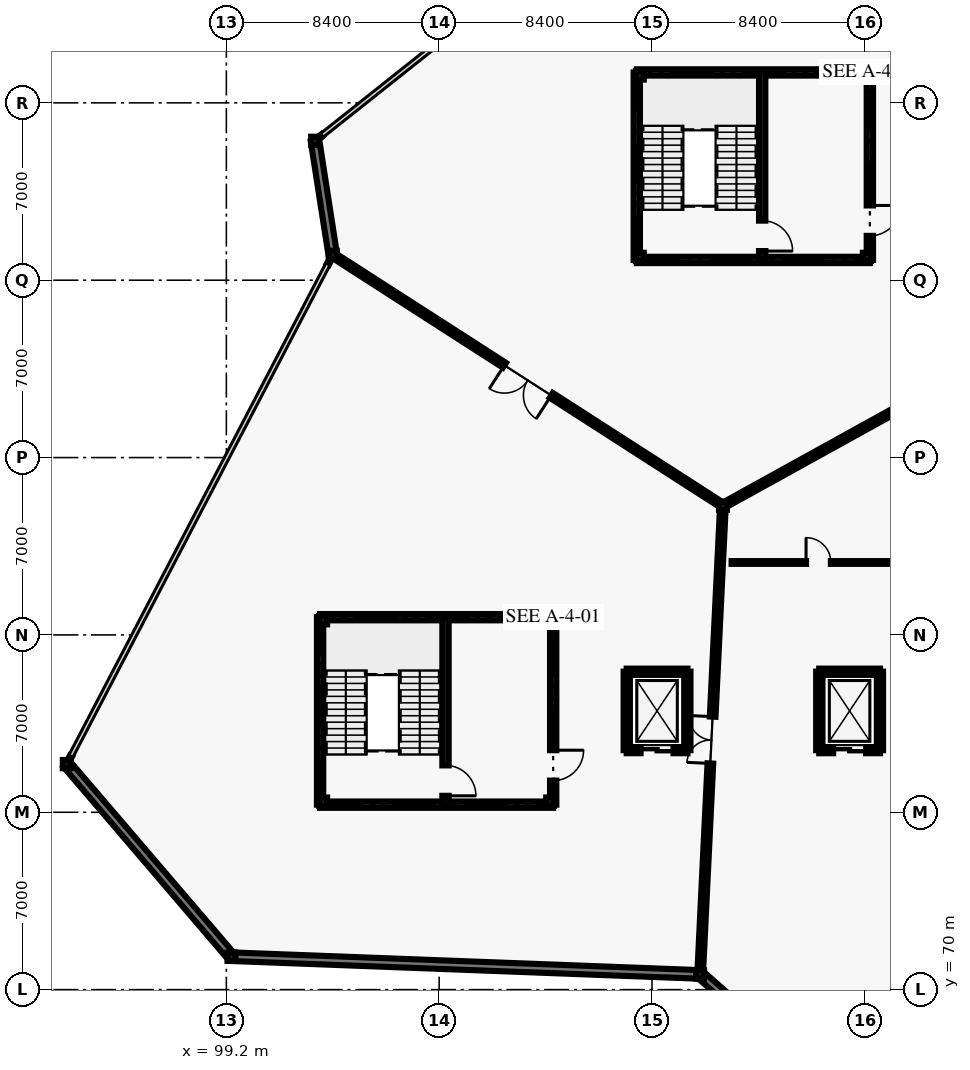
"""IFC4 building model, lengths in metres.
Left out: names, types, materials, properties, quantities, classifications, styles, units other than length and angle.
Written with IfcOpenShell. Run it as: python <this file> out.ifc"""

import sys

from ifc_helpers import new_model, si_unit, direction, frame, frame_2d, origin, origin_2d, place, context, subcontext, project, spatial, rectangle, i_section, extrude, element, fill, save


model = new_model("IFC4")
c1 = context("Model", 3, precision=1e-05, world=origin(), true_north=direction((0.0, 1.0)))
c2 = subcontext(c1, "Body", "Model", "MODEL_VIEW")
j1 = project(units=[si_unit("LENGTHUNIT", "METRE"), si_unit("PLANEANGLEUNIT", "RADIAN")], contexts=[c1])
p1 = place(None, origin())
s1 = spatial("IfcSite", under=j1, at=p1, CompositionType="ELEMENT")
p2 = place(p1, origin())
s2 = spatial("IfcBuilding", under=s1, at=p2, CompositionType="ELEMENT")
p3 = place(p2, frame((0.0, 0.0, 10.2)))
s3 = spatial("IfcBuildingStorey", under=s2, at=p3, CompositionType="ELEMENT", Elevation=10.2)
for number, where, z_axis, x_axis in (
    (1, (92.9, 78.9, 0.0), (0.0, 0.0, 1.0), (1.0, 0.0, 0.0)),
    (2, (99.4, 71.3, 0.0), (0.0, 0.0, 1.0), (1.0, 0.0, 0.0)),
    (3, (102.7, 103.5, 0.0), (0.0, 0.0, 1.0), (1.0, 0.0, 0.0)),
    (4, (103.4, 99.0, 0.0), (0.0, 0.0, 1.0), (1.0, 0.0, 0.0)),
    (5, (117.9, 70.6, 0.0), (0.0, 0.0, 1.0), (1.0, 0.0, 0.0)),
    (6, (118.8, 89.1, 0.0), (0.0, 0.0, 1.0), (1.0, 0.0, 0.0)),
    (7, (103.02, 77.42, 0.0), (0.0, 0.0, 1.0), (1.0, 0.0, 0.0)),
    (8, (111.98, 77.42, 0.0), (0.0, 0.0, 1.0), (1.0, 0.0, 0.0)),
    (9, (111.98, 84.58, 0.0), (0.0, 0.0, 1.0), (1.0, 0.0, 0.0)),
    (10, (103.02, 84.58, 0.0), (0.0, 0.0, 1.0), (1.0, 0.0, 0.0)),
    (11, (115.52, 98.92, 0.0), (0.0, 0.0, 1.0), (1.0, 0.0, 0.0)),
    (12, (124.48, 98.92, 0.0), (0.0, 0.0, 1.0), (1.0, 0.0, 0.0)),
    (13, (124.48, 106.08, 0.0), (0.0, 0.0, 1.0), (1.0, 0.0, 0.0)),
    (14, (115.52, 106.08, 0.0), (0.0, 0.0, 1.0), (1.0, 0.0, 0.0)),
):
    element("IfcColumn", number, at=place(p3, frame(where, z_axis=z_axis, x_axis=x_axis)), inside=s3, PredefinedType="COLUMN", context=c2, shape_type="SweptSolid", body=[
        extrude(i_section(OverallWidth=0.311, OverallDepth=0.327, WebThickness=0.016, FlangeThickness=0.025, FilletRadius=0.017, at=origin_2d()), origin(), (0.0, 0.0, 1.0), 4.8),
    ])
p4 = place(p3, frame((117.84, 70.602, 0.0), z_axis=(0.0, 0.0, 1.0), x_axis=(-0.999284381651, 0.037824920194, 0.0)))
e15 = element("IfcWall", 15, at=p4, inside=s3, PredefinedType="SOLIDWALL", context=c2, shape_type="SweptSolid", body=[
    extrude(rectangle(XDim=18.453, YDim=0.34, at=frame_2d((9.227, 0.0))), origin(), (0.0, 0.0, 1.0), 3.62),
])
for number, where, z_axis, x_axis in (
    (16, (92.919, 78.937, 0.0), (0.0, 0.0, 1.0), (0.464, 0.886, 0.0)),
    (17, (103.21, 98.637, 0.0), (0.0, 0.0, 1.0), (0.464, 0.886, 0.0)),
):
    element("IfcWall", number, at=place(p3, frame(where, z_axis=z_axis, x_axis=x_axis)), inside=s3, PredefinedType="SOLIDWALL", context=c2, shape_type="SweptSolid", body=[
        extrude(rectangle(XDim=0.308, YDim=0.095, at=frame_2d((0.154, 0.0))), origin(), (0.0, 0.0, 1.0), 3.62),
    ])
p5 = place(p3, frame((99.4, 71.3, 0.0), z_axis=(0.0, 0.0, 1.0), x_axis=(-0.649974737731, 0.75995581471, 0.0)))
e18 = element("IfcWall", 18, at=p5, inside=s3, PredefinedType="SOLIDWALL", context=c2, shape_type="SweptSolid", body=[
    extrude(rectangle(XDim=10.0, YDim=0.34, at=frame_2d((5.0, 0.0))), origin(), (0.0, 0.0, 1.0), 3.62),
])
p6 = place(p3, frame((125.5, 63.9, 0.0), z_axis=(0.0, 0.0, 1.0), x_axis=(-0.750131359252, 0.661288850554, 0.0)))
e19 = element("IfcWall", 19, at=p6, inside=s3, PredefinedType="SOLIDWALL", context=c2, shape_type="SweptSolid", body=[
    extrude(rectangle(XDim=10.072, YDim=0.34, at=frame_2d((5.036, 0.0))), origin(), (0.0, 0.0, 1.0), 3.62),
])
p7 = place(p3, frame((102.733, 103.526, 0.0), z_axis=(0.0, 0.0, 1.0), x_axis=(0.782180115256, 0.623052379257, 0.0)))
e20 = element("IfcWall", 20, at=p7, inside=s3, PredefinedType="SOLIDWALL", context=c2, shape_type="SweptSolid", body=[
    extrude(rectangle(XDim=0.308, YDim=0.095, at=frame_2d((0.154, 0.0))), origin(), (0.0, 0.0, 1.0), 3.62),
])
p8 = place(p3, frame((103.391, 99.059, 0.0), z_axis=(0.0, 0.0, 1.0), x_axis=(-0.153783616147, 0.988104548823, 0.0)))
e21 = element("IfcWall", 21, at=p8, inside=s3, PredefinedType="SOLIDWALL", context=c2, shape_type="SweptSolid", body=[
    extrude(rectangle(XDim=4.494, YDim=0.34, at=frame_2d((2.247, 0.0))), origin(), (0.0, 0.0, 1.0), 3.62),
])
p9 = place(p3, frame((117.9, 70.6, 0.0), z_axis=(0.0, 0.0, 1.0), x_axis=(0.048599072515, 0.998818366947, 0.0)))
e22 = element("IfcWall", 22, at=p9, inside=s3, PredefinedType="SOLIDWALL", context=c2, shape_type="SweptSolid", body=[
    extrude(rectangle(XDim=18.522, YDim=0.225, at=frame_2d((9.261, 0.0))), origin(), (0.0, 0.0, 1.0), 4.02),
])
p10 = place(p9, frame((8.336, 0.0, 0.0)))
e23 = element("IfcOpeningElement", 23, at=p10, cuts=e22, PredefinedType="OPENING", context=c2, shape_type="SweptSolid", body=[
    extrude(rectangle(XDim=1.85, YDim=2.4, at=frame_2d((0.925, 1.2))), frame((0.0, 0.123, 0.0), z_axis=(0.0, -1.0, 0.0), x_axis=(1.0, 0.0, 0.0)), (0.0, 0.0, 1.0), 0.245),
])
p11 = place(p3, frame((118.8, 89.1, 0.0), z_axis=(0.0, 0.0, 1.0), x_axis=(-0.841183241423, 0.540750177392, 0.0)))
e24 = element("IfcWall", 24, at=p11, inside=s3, PredefinedType="SOLIDWALL", context=c2, shape_type="SweptSolid", body=[
    extrude(rectangle(XDim=18.308, YDim=0.225, at=frame_2d((9.154, 0.0))), origin(), (0.0, 0.0, 1.0), 4.02),
])
p12 = place(p11, frame((8.054, 0.0, 0.0)))
e25 = element("IfcOpeningElement", 25, at=p12, cuts=e24, PredefinedType="OPENING", context=c2, shape_type="SweptSolid", body=[
    extrude(rectangle(XDim=2.2, YDim=2.6, at=frame_2d((1.1, 1.3))), frame((0.0, 0.123, 0.0), z_axis=(0.0, -1.0, 0.0), x_axis=(1.0, 0.0, 0.0)), (0.0, 0.0, 1.0), 0.245),
])
p13 = place(p3, frame((134.9, 98.0, 0.0), z_axis=(0.0, 0.0, 1.0), x_axis=(-0.875181353329, -0.483794996652, 0.0)))
e26 = element("IfcWall", 26, at=p13, inside=s3, PredefinedType="SOLIDWALL", context=c2, shape_type="SweptSolid", body=[
    extrude(rectangle(XDim=18.396, YDim=0.225, at=frame_2d((9.198, 0.0))), origin(), (0.0, 0.0, 1.0), 4.02),
])
p14 = place(p13, frame((8.198, 0.0, 0.0)))
e27 = element("IfcOpeningElement", 27, at=p14, cuts=e26, PredefinedType="OPENING", context=c2, shape_type="SweptSolid", body=[
    extrude(rectangle(XDim=2.0, YDim=2.5, at=frame_2d((1.0, 1.25))), frame((0.0, 0.123, 0.0), z_axis=(0.0, -1.0, 0.0), x_axis=(1.0, 0.0, 0.0)), (0.0, 0.0, 1.0), 0.245),
])
p15 = place(p3, frame((119.142, 86.859, 0.0), z_axis=(0.0, 0.0, 1.0), x_axis=(1.0, 0.0, 0.0)))
e28 = element("IfcWall", 28, at=p15, inside=s3, PredefinedType="PARTITIONING", context=c2, shape_type="SweptSolid", body=[
    extrude(rectangle(XDim=6.858, YDim=0.11, at=frame_2d((3.429, 0.0))), origin(), (0.0, 0.0, 1.0), 3.32),
])
p16 = place(p15, frame((2.939, 0.0, 0.0)))
e29 = element("IfcOpeningElement", 29, at=p16, cuts=e28, PredefinedType="OPENING", context=c2, shape_type="SweptSolid", body=[
    extrude(rectangle(XDim=0.98, YDim=2.15, at=frame_2d((0.49, 1.075))), frame((0.0, 0.065, 0.0), z_axis=(0.0, -1.0, 0.0), x_axis=(1.0, 0.0, 0.0)), (0.0, 0.0, 1.0), 0.13),
])
p17 = place(p3, frame((102.9, 77.3, 0.0), z_axis=(0.0, 0.0, 1.0), x_axis=(0.0, 1.0, 0.0)))
e30 = element("IfcWall", 30, at=p17, inside=s3, PredefinedType="SHEAR", context=c2, shape_type="SweptSolid", body=[
    extrude(rectangle(XDim=7.4, YDim=0.25, at=frame_2d((3.7, 0.0))), origin(), (0.0, 0.0, 1.0), 4.56),
])
for number, where, z_axis, x_axis in (
    (31, (102.9, 84.7, 0.0), (0.0, 0.0, 1.0), (1.0, 0.0, 0.0)),
    (32, (112.1, 77.3, 0.0), (0.0, 0.0, 1.0), (-1.0, 0.0, 0.0)),
):
    element("IfcWall", number, at=place(p3, frame(where, z_axis=z_axis, x_axis=x_axis)), inside=s3, PredefinedType="SHEAR", context=c2, shape_type="SweptSolid", body=[
        extrude(rectangle(XDim=9.2, YDim=0.25, at=frame_2d((4.6, 0.0))), origin(), (0.0, 0.0, 1.0), 4.56),
    ])
p18 = place(p3, frame((112.1, 84.7, 0.0), z_axis=(0.0, 0.0, 1.0), x_axis=(0.0, -1.0, 0.0)))
e33 = element("IfcWall", 33, at=p18, inside=s3, PredefinedType="SHEAR", context=c2, shape_type="SweptSolid", body=[
    extrude(rectangle(XDim=7.4, YDim=0.25, at=frame_2d((3.7, 0.0))), origin(), (0.0, 0.0, 1.0), 4.56),
])
p19 = place(p18, frame((5.25, 0.0, 0.0)))
e34 = element("IfcOpeningElement", 34, at=p19, cuts=e33, PredefinedType="OPENING", context=c2, shape_type="SweptSolid", body=[
    extrude(rectangle(XDim=1.2, YDim=2.2, at=frame_2d((0.6, 1.1))), frame((0.0, 0.135, 0.0), z_axis=(0.0, -1.0, 0.0), x_axis=(1.0, 0.0, 0.0)), (0.0, 0.0, 1.0), 0.27),
])
p20 = place(p3, frame((107.85, 84.7, 0.0), z_axis=(0.0, 0.0, 1.0), x_axis=(0.0, -1.0, 0.0)))
e35 = element("IfcWall", 35, at=p20, inside=s3, PredefinedType="SHEAR", context=c2, shape_type="SweptSolid", body=[
    extrude(rectangle(XDim=7.4, YDim=0.25, at=frame_2d((3.7, 0.0))), origin(), (0.0, 0.0, 1.0), 4.56),
])
p21 = place(p20, frame((5.85, 0.0, 0.0)))
e36 = element("IfcOpeningElement", 36, at=p21, cuts=e35, PredefinedType="OPENING", context=c2, shape_type="SweptSolid", body=[
    extrude(rectangle(XDim=1.2, YDim=2.2, at=frame_2d((0.6, 1.1))), frame((0.0, 0.135, 0.0), z_axis=(0.0, -1.0, 0.0), x_axis=(1.0, 0.0, 0.0)), (0.0, 0.0, 1.0), 0.27),
])
p22 = place(p3, frame((115.4, 98.8, 0.0), z_axis=(0.0, 0.0, 1.0), x_axis=(0.0, 1.0, 0.0)))
e37 = element("IfcWall", 37, at=p22, inside=s3, PredefinedType="SHEAR", context=c2, shape_type="SweptSolid", body=[
    extrude(rectangle(XDim=7.4, YDim=0.25, at=frame_2d((3.7, 0.0))), origin(), (0.0, 0.0, 1.0), 4.56),
])
for number, where, z_axis, x_axis in (
    (38, (115.4, 106.2, 0.0), (0.0, 0.0, 1.0), (1.0, 0.0, 0.0)),
    (39, (124.6, 98.8, 0.0), (0.0, 0.0, 1.0), (-1.0, 0.0, 0.0)),
):
    element("IfcWall", number, at=place(p3, frame(where, z_axis=z_axis, x_axis=x_axis)), inside=s3, PredefinedType="SHEAR", context=c2, shape_type="SweptSolid", body=[
        extrude(rectangle(XDim=9.2, YDim=0.25, at=frame_2d((4.6, 0.0))), origin(), (0.0, 0.0, 1.0), 4.56),
    ])
p23 = place(p3, frame((124.6, 106.2, 0.0), z_axis=(0.0, 0.0, 1.0), x_axis=(0.0, -1.0, 0.0)))
e40 = element("IfcWall", 40, at=p23, inside=s3, PredefinedType="SHEAR", context=c2, shape_type="SweptSolid", body=[
    extrude(rectangle(XDim=7.4, YDim=0.25, at=frame_2d((3.7, 0.0))), origin(), (0.0, 0.0, 1.0), 4.56),
])
p24 = place(p23, frame((5.25, 0.0, 0.0)))
e41 = element("IfcOpeningElement", 41, at=p24, cuts=e40, PredefinedType="OPENING", context=c2, shape_type="SweptSolid", body=[
    extrude(rectangle(XDim=1.2, YDim=2.2, at=frame_2d((0.6, 1.1))), frame((0.0, 0.135, 0.0), z_axis=(0.0, -1.0, 0.0), x_axis=(1.0, 0.0, 0.0)), (0.0, 0.0, 1.0), 0.27),
])
p25 = place(p3, frame((120.35, 106.2, 0.0), z_axis=(0.0, 0.0, 1.0), x_axis=(0.0, -1.0, 0.0)))
e42 = element("IfcWall", 42, at=p25, inside=s3, PredefinedType="SHEAR", context=c2, shape_type="SweptSolid", body=[
    extrude(rectangle(XDim=7.4, YDim=0.25, at=frame_2d((3.7, 0.0))), origin(), (0.0, 0.0, 1.0), 4.56),
])
p26 = place(p25, frame((5.85, 0.0, 0.0)))
e43 = element("IfcOpeningElement", 43, at=p26, cuts=e42, PredefinedType="OPENING", context=c2, shape_type="SweptSolid", body=[
    extrude(rectangle(XDim=1.2, YDim=2.2, at=frame_2d((0.6, 1.1))), frame((0.0, 0.135, 0.0), z_axis=(0.0, -1.0, 0.0), x_axis=(1.0, 0.0, 0.0)), (0.0, 0.0, 1.0), 0.27),
])
p27 = place(p3, frame((115.0, 82.55, 0.0), z_axis=(0.0, 0.0, 1.0), x_axis=(1.0, 0.0, 0.0)))
e44 = element("IfcWall", 44, at=p27, inside=s3, PredefinedType="SHEAR", context=c2, shape_type="SweptSolid", body=[
    extrude(rectangle(XDim=2.4, YDim=0.24, at=frame_2d((1.2, 0.0))), origin(), (0.0, 0.0, 1.0), 4.56),
])
for number, where, z_axis, x_axis in (
    (45, (117.4, 82.55, 0.0), (0.0, 0.0, 1.0), (0.0, -1.0, 0.0)),
    (46, (115.0, 79.45, 0.0), (0.0, 0.0, 1.0), (0.0, 1.0, 0.0)),
):
    element("IfcWall", number, at=place(p3, frame(where, z_axis=z_axis, x_axis=x_axis)), inside=s3, PredefinedType="SHEAR", context=c2, shape_type="SweptSolid", body=[
        extrude(rectangle(XDim=3.1, YDim=0.24, at=frame_2d((1.55, 0.0))), origin(), (0.0, 0.0, 1.0), 4.56),
    ])
p28 = place(p3, frame((117.4, 79.45, 0.0), z_axis=(0.0, 0.0, 1.0), x_axis=(-1.0, 0.0, 0.0)))
e47 = element("IfcWall", 47, at=p28, inside=s3, PredefinedType="SHEAR", context=c2, shape_type="SweptSolid", body=[
    extrude(rectangle(XDim=2.4, YDim=0.24, at=frame_2d((1.2, 0.0))), origin(), (0.0, 0.0, 1.0), 4.56),
])
p29 = place(p28, frame((0.55, 0.0, 0.0)))
e48 = element("IfcOpeningElement", 48, at=p29, cuts=e47, PredefinedType="OPENING", context=c2, shape_type="SweptSolid", body=[
    extrude(rectangle(XDim=1.3, YDim=2.25, at=frame_2d((0.65, 1.125))), frame((0.0, 0.13, 0.0), z_axis=(0.0, -1.0, 0.0), x_axis=(1.0, 0.0, 0.0)), (0.0, 0.0, 1.0), 0.26),
])
p30 = place(p3, frame((122.6, 82.55, 0.0), z_axis=(0.0, 0.0, 1.0), x_axis=(1.0, 0.0, 0.0)))
e49 = element("IfcWall", 49, at=p30, inside=s3, PredefinedType="SHEAR", context=c2, shape_type="SweptSolid", body=[
    extrude(rectangle(XDim=2.4, YDim=0.24, at=frame_2d((1.2, 0.0))), origin(), (0.0, 0.0, 1.0), 4.56),
])
for number, where, z_axis, x_axis in (
    (50, (125.0, 82.55, 0.0), (0.0, 0.0, 1.0), (0.0, -1.0, 0.0)),
    (51, (122.6, 79.45, 0.0), (0.0, 0.0, 1.0), (0.0, 1.0, 0.0)),
):
    element("IfcWall", number, at=place(p3, frame(where, z_axis=z_axis, x_axis=x_axis)), inside=s3, PredefinedType="SHEAR", context=c2, shape_type="SweptSolid", body=[
        extrude(rectangle(XDim=3.1, YDim=0.24, at=frame_2d((1.55, 0.0))), origin(), (0.0, 0.0, 1.0), 4.56),
    ])
p31 = place(p3, frame((125.0, 79.45, 0.0), z_axis=(0.0, 0.0, 1.0), x_axis=(-1.0, 0.0, 0.0)))
e52 = element("IfcWall", 52, at=p31, inside=s3, PredefinedType="SHEAR", context=c2, shape_type="SweptSolid", body=[
    extrude(rectangle(XDim=2.4, YDim=0.24, at=frame_2d((1.2, 0.0))), origin(), (0.0, 0.0, 1.0), 4.56),
])
p32 = place(p31, frame((0.55, 0.0, 0.0)))
e53 = element("IfcOpeningElement", 53, at=p32, cuts=e52, PredefinedType="OPENING", context=c2, shape_type="SweptSolid", body=[
    extrude(rectangle(XDim=1.3, YDim=2.25, at=frame_2d((0.65, 1.125))), frame((0.0, 0.13, 0.0), z_axis=(0.0, -1.0, 0.0), x_axis=(1.0, 0.0, 0.0)), (0.0, 0.0, 1.0), 0.26),
])
p33 = place(p10, origin())
e54 = element("IfcDoor", 54, at=p33, inside=s3, OperationType="DOUBLE_DOOR_SINGLE_SWING", PredefinedType="DOOR", context=c2, shape_type="SweptSolid", body=[
    extrude(rectangle(XDim=1.85, YDim=2.4, at=frame_2d((0.925, 1.2))), frame((0.0, 0.025, 0.0), z_axis=(0.0, -1.0, 0.0), x_axis=(1.0, 0.0, 0.0)), (0.0, 0.0, 1.0), 0.05),
])
fill(e23, e54)
p34 = place(p12, origin())
e55 = element("IfcDoor", 55, at=p34, inside=s3, OperationType="DOUBLE_DOOR_SINGLE_SWING", PredefinedType="DOOR", context=c2, shape_type="SweptSolid", body=[
    extrude(rectangle(XDim=2.2, YDim=2.6, at=frame_2d((1.1, 1.3))), frame((0.0, 0.025, 0.0), z_axis=(0.0, -1.0, 0.0), x_axis=(1.0, 0.0, 0.0)), (0.0, 0.0, 1.0), 0.05),
])
fill(e25, e55)
p35 = place(p16, origin())
e56 = element("IfcDoor", 56, at=p35, inside=s3, OperationType="SINGLE_SWING_LEFT", PredefinedType="DOOR", context=c2, shape_type="SweptSolid", body=[
    extrude(rectangle(XDim=0.98, YDim=2.15, at=frame_2d((0.49, 1.075))), frame((0.0, 0.025, 0.0), z_axis=(0.0, -1.0, 0.0), x_axis=(1.0, 0.0, 0.0)), (0.0, 0.0, 1.0), 0.05),
])
fill(e29, e56)
p36 = place(p19, origin())
e57 = element("IfcDoor", 57, at=p36, inside=s3, OperationType="SINGLE_SWING_LEFT", PredefinedType="DOOR", context=c2, shape_type="SweptSolid", body=[
    extrude(rectangle(XDim=1.2, YDim=2.2, at=frame_2d((0.6, 1.1))), frame((0.0, 0.025, 0.0), z_axis=(0.0, -1.0, 0.0), x_axis=(1.0, 0.0, 0.0)), (0.0, 0.0, 1.0), 0.05),
])
fill(e34, e57)
p37 = place(p21, origin())
e58 = element("IfcDoor", 58, at=p37, inside=s3, OperationType="SINGLE_SWING_RIGHT", PredefinedType="DOOR", context=c2, shape_type="SweptSolid", body=[
    extrude(rectangle(XDim=1.2, YDim=2.2, at=frame_2d((0.6, 1.1))), frame((0.0, 0.025, 0.0), z_axis=(0.0, -1.0, 0.0), x_axis=(1.0, 0.0, 0.0)), (0.0, 0.0, 1.0), 0.05),
])
fill(e36, e58)
p38 = place(p24, origin())
e59 = element("IfcDoor", 59, at=p38, inside=s3, OperationType="SINGLE_SWING_LEFT", PredefinedType="DOOR", context=c2, shape_type="SweptSolid", body=[
    extrude(rectangle(XDim=1.2, YDim=2.2, at=frame_2d((0.6, 1.1))), frame((0.0, 0.025, 0.0), z_axis=(0.0, -1.0, 0.0), x_axis=(1.0, 0.0, 0.0)), (0.0, 0.0, 1.0), 0.05),
])
fill(e41, e59)
p39 = place(p26, origin())
e60 = element("IfcDoor", 60, at=p39, inside=s3, OperationType="SINGLE_SWING_RIGHT", PredefinedType="DOOR", context=c2, shape_type="SweptSolid", body=[
    extrude(rectangle(XDim=1.2, YDim=2.2, at=frame_2d((0.6, 1.1))), frame((0.0, 0.025, 0.0), z_axis=(0.0, -1.0, 0.0), x_axis=(1.0, 0.0, 0.0)), (0.0, 0.0, 1.0), 0.05),
])
fill(e43, e60)
p40 = place(p29, origin())
e61 = element("IfcDoor", 61, at=p40, inside=s3, OperationType="SLIDING_TO_LEFT", PredefinedType="DOOR", context=c2, shape_type="SweptSolid", body=[
    extrude(rectangle(XDim=1.3, YDim=2.25, at=frame_2d((0.65, 1.125))), frame((0.0, 0.025, 0.0), z_axis=(0.0, -1.0, 0.0), x_axis=(1.0, 0.0, 0.0)), (0.0, 0.0, 1.0), 0.05),
])
fill(e48, e61)
p41 = place(p32, origin())
e62 = element("IfcDoor", 62, at=p41, inside=s3, OperationType="SLIDING_TO_LEFT", PredefinedType="DOOR", context=c2, shape_type="SweptSolid", body=[
    extrude(rectangle(XDim=1.3, YDim=2.25, at=frame_2d((0.65, 1.125))), frame((0.0, 0.025, 0.0), z_axis=(0.0, -1.0, 0.0), x_axis=(1.0, 0.0, 0.0)), (0.0, 0.0, 1.0), 0.05),
])
fill(e53, e62)
save(model, sys.argv[1])
